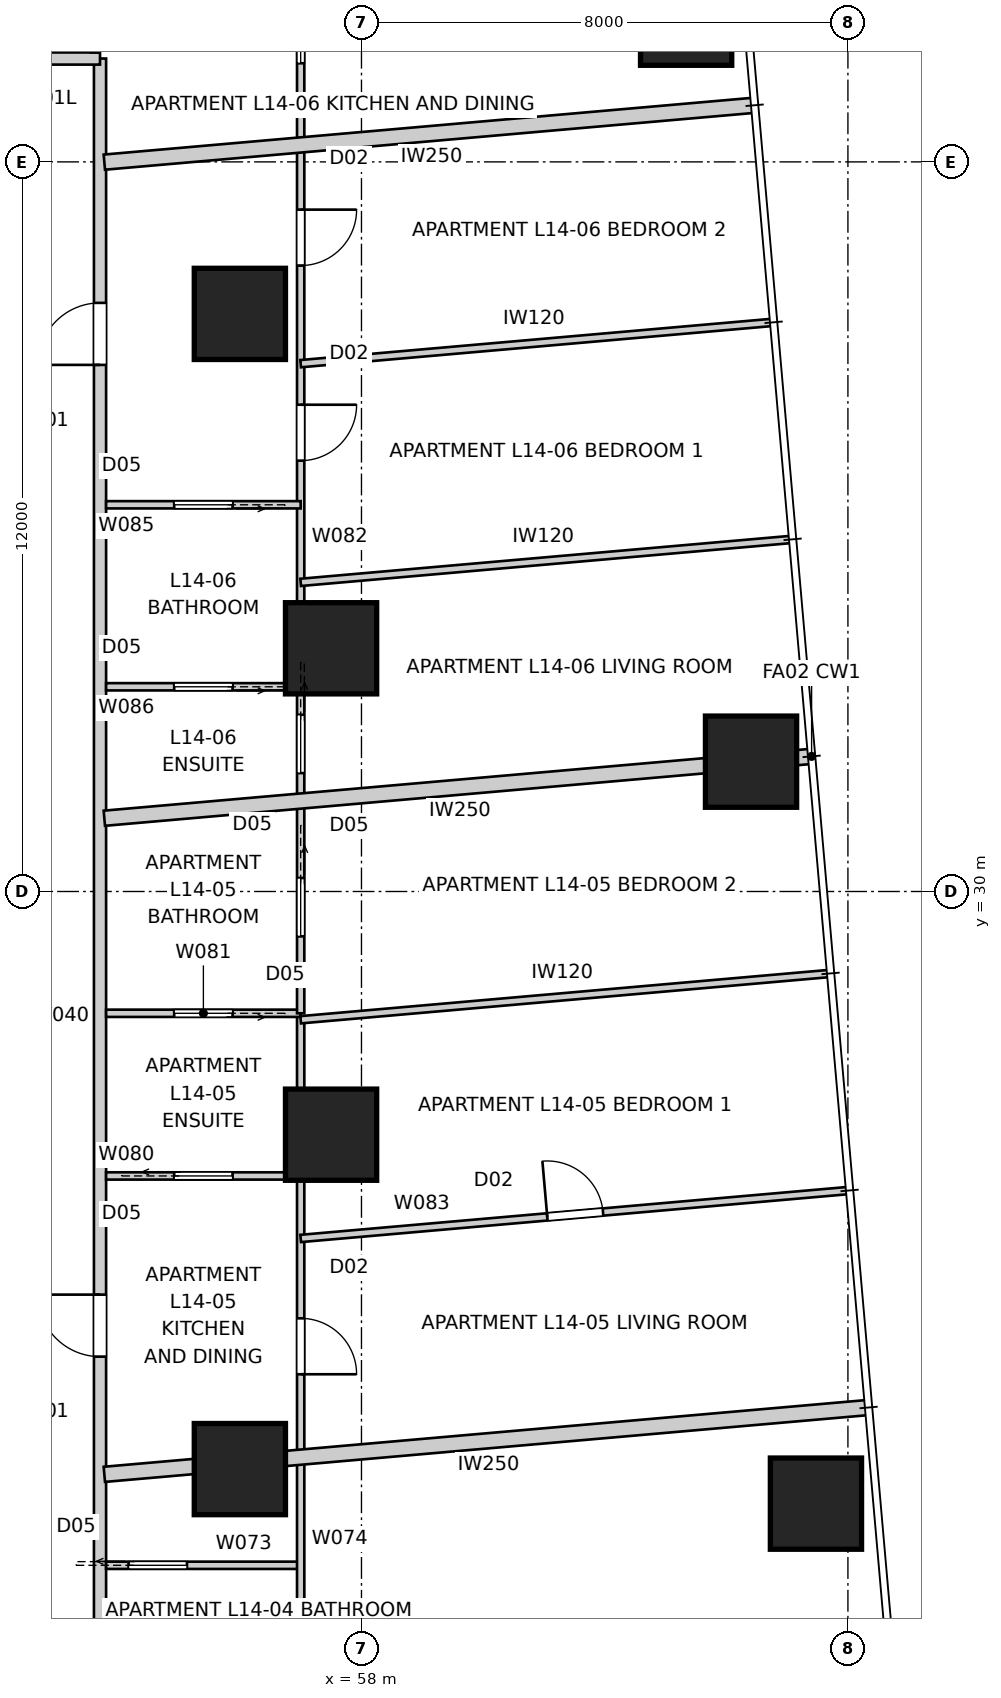
"""IFC4 building model, lengths in metres.
Left out: names, types, materials, properties, quantities, classifications, styles, units other than length and angle.
Written with IfcOpenShell. Run it as: python <this file> out.ifc"""

import sys

from ifc_helpers import new_model, si_unit, direction, frame, frame_2d, origin, origin_2d, place, context, subcontext, project, spatial, rectangle, extrude, element, fill, save


model = new_model("IFC4")
c1 = context("Model", 3, precision=1e-05, world=origin(), true_north=direction((0.0, 1.0)))
c2 = subcontext(c1, "Body", "Model", "MODEL_VIEW")
j1 = project(units=[si_unit("LENGTHUNIT", "METRE"), si_unit("PLANEANGLEUNIT", "RADIAN")], contexts=[c1])
p1 = place(None, origin())
s1 = spatial("IfcSite", under=j1, at=p1, CompositionType="ELEMENT")
p2 = place(p1, origin())
s2 = spatial("IfcBuilding", under=s1, at=p2, CompositionType="ELEMENT")
p3 = place(p2, frame((0.0, 0.0, 54.0)))
s3 = spatial("IfcBuildingStorey", under=s2, at=p3, CompositionType="ELEMENT", Elevation=54.0)
for number, where, z_axis, x_axis in (
    (1, (65.474, 19.932, 0.0), (0.0, 0.0, 1.0), (1.0, 0.0, 0.0)),
    (2, (64.407, 32.135, 0.0), (0.0, 0.0, 1.0), (1.0, 0.0, 0.0)),
    (3, (63.339, 44.339, 0.0), (0.0, 0.0, 1.0), (1.0, 0.0, 0.0)),
    (4, (57.5, 26.0, 0.0), (0.0, 0.0, 1.0), (1.0, 0.0, 0.0)),
    (5, (57.5, 34.0, 0.0), (0.0, 0.0, 1.0), (1.0, 0.0, 0.0)),
    (6, (56.0, 39.5, 0.0), (0.0, 0.0, 1.0), (1.0, 0.0, 0.0)),
    (7, (56.0, 20.5, 0.0), (0.0, 0.0, 1.0), (1.0, 0.0, 0.0)),
):
    element("IfcColumn", number, at=place(p3, frame(where, z_axis=z_axis, x_axis=x_axis)), inside=s3, PredefinedType="COLUMN", context=c2, shape_type="SweptSolid", body=[
        extrude(rectangle(XDim=1.5, YDim=1.5, at=origin_2d()), origin(), (0.0, 0.0, 1.0), 3.4),
    ])
p4 = place(p3, frame((53.7, 15.5, 0.0), z_axis=(0.0, 0.0, 1.0), x_axis=(0.0, 1.0, 0.0)))
e8 = element("IfcWall", 8, at=p4, inside=s3, PredefinedType="PARTITIONING", context=c2, shape_type="SweptSolid", body=[
    extrude(rectangle(XDim=28.2, YDim=0.2, at=frame_2d((14.1, 0.0))), origin(), (0.0, 0.0, 1.0), 3.25),
])
p5 = place(p4, frame((23.161, 0.0, 0.0)))
e9 = element("IfcOpeningElement", 9, at=p5, cuts=e8, PredefinedType="OPENING", context=c2, shape_type="SweptSolid", body=[
    extrude(rectangle(XDim=1.02, YDim=2.34, at=frame_2d((0.51, 1.17))), frame((0.0, 0.11, 0.0), z_axis=(0.0, -1.0, 0.0), x_axis=(1.0, 0.0, 0.0)), (0.0, 0.0, 1.0), 0.22),
])
p6 = place(p4, frame((6.85, 0.0, 0.0)))
e10 = element("IfcOpeningElement", 10, at=p6, cuts=e8, PredefinedType="OPENING", context=c2, shape_type="SweptSolid", body=[
    extrude(rectangle(XDim=1.02, YDim=2.34, at=frame_2d((0.51, 1.17))), frame((0.0, 0.11, 0.0), z_axis=(0.0, -1.0, 0.0), x_axis=(1.0, 0.0, 0.0)), (0.0, 0.0, 1.0), 0.22),
])
p7 = place(p3, frame((53.7, 43.7, 0.0), z_axis=(0.0, 0.0, 1.0), x_axis=(-1.0, 0.0, 0.0)))
e11 = element("IfcWall", 11, at=p7, inside=s3, PredefinedType="PARTITIONING", context=c2, shape_type="SweptSolid", body=[
    extrude(rectangle(XDim=28.2, YDim=0.2, at=frame_2d((14.1, 0.0))), origin(), (0.0, 0.0, 1.0), 3.25),
])
p8 = place(p7, frame((6.194, 0.0, 0.0)))
e12 = element("IfcOpeningElement", 12, at=p8, cuts=e11, PredefinedType="OPENING", context=c2, shape_type="SweptSolid", body=[
    extrude(rectangle(XDim=1.02, YDim=2.34, at=frame_2d((0.51, 1.17))), frame((0.0, 0.11, 0.0), z_axis=(0.0, -1.0, 0.0), x_axis=(1.0, 0.0, 0.0)), (0.0, 0.0, 1.0), 0.22),
])
p9 = place(p7, frame((1.715, 0.0, 0.0)))
e13 = element("IfcOpeningElement", 13, at=p9, cuts=e11, PredefinedType="OPENING", context=c2, shape_type="SweptSolid", body=[
    extrude(rectangle(XDim=1.02, YDim=2.1, at=frame_2d((0.51, 1.05))), frame((0.0, 0.11, 0.0), z_axis=(0.0, -1.0, 0.0), x_axis=(1.0, 0.0, 0.0)), (0.0, 0.0, 1.0), 0.22),
])
p10 = place(p7, frame((16.215, 0.0, 0.0)))
e14 = element("IfcOpeningElement", 14, at=p10, cuts=e11, PredefinedType="OPENING", context=c2, shape_type="SweptSolid", body=[
    extrude(rectangle(XDim=1.02, YDim=2.34, at=frame_2d((0.51, 1.17))), frame((0.0, 0.11, 0.0), z_axis=(0.0, -1.0, 0.0), x_axis=(1.0, 0.0, 0.0)), (0.0, 0.0, 1.0), 0.22),
])
p11 = place(p7, frame((26.255, 0.0, 0.0)))
e15 = element("IfcOpeningElement", 15, at=p11, cuts=e11, PredefinedType="OPENING", context=c2, shape_type="SweptSolid", body=[
    extrude(rectangle(XDim=1.02, YDim=2.34, at=frame_2d((0.51, 1.17))), frame((0.0, 0.11, 0.0), z_axis=(0.0, -1.0, 0.0), x_axis=(1.0, 0.0, 0.0)), (0.0, 0.0, 1.0), 0.22),
])
p12 = place(p3, frame((65.403, 32.222, 0.0), z_axis=(0.0, 0.0, 1.0), x_axis=(-0.996195419442, -0.087147497287, 0.0)))
e16 = element("IfcWall", 16, at=p12, inside=s3, PredefinedType="PARTITIONING", context=c2, shape_type="SweptSolid", body=[
    extrude(rectangle(XDim=11.677, YDim=0.25, at=frame_2d((5.838, 0.0))), origin(), (0.0, 0.0, 1.0), 3.25),
])
p13 = place(p3, frame((66.34, 21.513, 0.0), z_axis=(0.0, 0.0, 1.0), x_axis=(-0.996194851608, -0.087153988028, 0.0)))
e17 = element("IfcWall", 17, at=p13, inside=s3, PredefinedType="PARTITIONING", context=c2, shape_type="SweptSolid", body=[
    extrude(rectangle(XDim=12.617, YDim=0.25, at=frame_2d((6.309, 0.0))), origin(), (0.0, 0.0, 1.0), 3.25),
])
p14 = place(p3, frame((64.466, 42.932, 0.0), z_axis=(0.0, 0.0, 1.0), x_axis=(-0.996193939644, -0.08716441141, 0.0)))
e18 = element("IfcWall", 18, at=p14, inside=s3, PredefinedType="PARTITIONING", context=c2, shape_type="SweptSolid", body=[
    extrude(rectangle(XDim=10.736, YDim=0.25, at=frame_2d((5.368, 0.0))), origin(), (0.0, 0.0, 1.0), 3.25),
])
p15 = place(p3, frame((53.8, 18.918, 0.0), z_axis=(0.0, 0.0, 1.0), x_axis=(1.0, 0.0, 0.0)))
e19 = element("IfcWall", 19, at=p15, inside=s3, PredefinedType="PARTITIONING", context=c2, shape_type="SweptSolid", body=[
    extrude(rectangle(XDim=3.2, YDim=0.12, at=frame_2d((1.6, 0.0))), origin(), (0.0, 0.0, 1.0), 3.25),
])
p16 = place(p15, frame((0.37, 0.0, 0.0)))
e20 = element("IfcOpeningElement", 20, at=p16, cuts=e19, PredefinedType="OPENING", context=c2, shape_type="SweptSolid", body=[
    extrude(rectangle(XDim=0.96, YDim=2.1, at=frame_2d((0.48, 1.05))), frame((0.0, 0.07, 0.0), z_axis=(0.0, -1.0, 0.0), x_axis=(1.0, 0.0, 0.0)), (0.0, 0.0, 1.0), 0.14),
])
p17 = place(p3, frame((57.0, 27.94, 0.0), z_axis=(0.0, 0.0, 1.0), x_axis=(0.0, -1.0, 0.0)))
e21 = element("IfcWall", 21, at=p17, inside=s3, PredefinedType="PARTITIONING", context=c2, shape_type="SweptSolid", body=[
    extrude(rectangle(XDim=14.94, YDim=0.12, at=frame_2d((7.47, 0.0))), origin(), (0.0, 0.0, 1.0), 2.55),
])
p18 = place(p17, frame((4.961, 0.0, 0.0)))
e22 = element("IfcOpeningElement", 22, at=p18, cuts=e21, PredefinedType="OPENING", context=c2, shape_type="SweptSolid", body=[
    extrude(rectangle(XDim=0.92, YDim=2.34, at=frame_2d((0.46, 1.17))), frame((0.0, 0.07, 0.0), z_axis=(0.0, -1.0, 0.0), x_axis=(1.0, 0.0, 0.0)), (0.0, 0.0, 1.0), 0.14),
])
p19 = place(p17, frame((11.296, 0.0, 0.0)))
e23 = element("IfcOpeningElement", 23, at=p19, cuts=e21, PredefinedType="OPENING", context=c2, shape_type="SweptSolid", body=[
    extrude(rectangle(XDim=0.92, YDim=2.34, at=frame_2d((0.46, 1.17))), frame((0.0, 0.07, 0.0), z_axis=(0.0, -1.0, 0.0), x_axis=(1.0, 0.0, 0.0)), (0.0, 0.0, 1.0), 0.14),
])
p20 = place(p3, frame((53.8, 25.322, 0.0), z_axis=(0.0, 0.0, 1.0), x_axis=(1.0, 0.0, 0.0)))
e24 = element("IfcWall", 24, at=p20, inside=s3, PredefinedType="PARTITIONING", context=c2, shape_type="SweptSolid", body=[
    extrude(rectangle(XDim=3.2, YDim=0.12, at=frame_2d((1.6, 0.0))), origin(), (0.0, 0.0, 1.0), 3.25),
])
p21 = place(p20, frame((1.12, 0.0, 0.0)))
e25 = element("IfcOpeningElement", 25, at=p21, cuts=e24, PredefinedType="OPENING", context=c2, shape_type="SweptSolid", body=[
    extrude(rectangle(XDim=0.96, YDim=2.1, at=frame_2d((0.48, 1.05))), frame((0.0, 0.07, 0.0), z_axis=(0.0, -1.0, 0.0), x_axis=(1.0, 0.0, 0.0)), (0.0, 0.0, 1.0), 0.14),
])
p22 = place(p3, frame((57.0, 27.997, 0.0), z_axis=(0.0, 0.0, 1.0), x_axis=(-1.0, 0.0, 0.0)))
e26 = element("IfcWall", 26, at=p22, inside=s3, PredefinedType="PARTITIONING", context=c2, shape_type="SweptSolid", body=[
    extrude(rectangle(XDim=3.2, YDim=0.12, at=frame_2d((1.6, 0.0))), origin(), (0.0, 0.0, 1.0), 3.25),
])
p23 = place(p22, frame((1.12, 0.0, 0.0)))
e27 = element("IfcOpeningElement", 27, at=p23, cuts=e26, PredefinedType="OPENING", context=c2, shape_type="SweptSolid", body=[
    extrude(rectangle(XDim=0.96, YDim=2.1, at=frame_2d((0.48, 1.05))), frame((0.0, 0.07, 0.0), z_axis=(0.0, -1.0, 0.0), x_axis=(1.0, 0.0, 0.0)), (0.0, 0.0, 1.0), 0.14),
])
p24 = place(p3, frame((57.0, 47.0, 0.0), z_axis=(0.0, 0.0, 1.0), x_axis=(0.0, -1.0, 0.0)))
e28 = element("IfcWall", 28, at=p24, inside=s3, PredefinedType="PARTITIONING", context=c2, shape_type="SweptSolid", body=[
    extrude(rectangle(XDim=19.003, YDim=0.12, at=frame_2d((9.501, 0.0))), origin(), (0.0, 0.0, 1.0), 2.55),
])
p25 = place(p24, frame((5.785, 0.0, 0.0)))
e29 = element("IfcOpeningElement", 29, at=p25, cuts=e28, PredefinedType="OPENING", context=c2, shape_type="SweptSolid", body=[
    extrude(rectangle(XDim=0.92, YDim=2.34, at=frame_2d((0.46, 1.17))), frame((0.0, 0.07, 0.0), z_axis=(0.0, -1.0, 0.0), x_axis=(1.0, 0.0, 0.0)), (0.0, 0.0, 1.0), 0.14),
])
p26 = place(p24, frame((8.994, 0.0, 0.0)))
e30 = element("IfcOpeningElement", 30, at=p26, cuts=e28, PredefinedType="OPENING", context=c2, shape_type="SweptSolid", body=[
    extrude(rectangle(XDim=0.92, YDim=2.34, at=frame_2d((0.46, 1.17))), frame((0.0, 0.07, 0.0), z_axis=(0.0, -1.0, 0.0), x_axis=(1.0, 0.0, 0.0)), (0.0, 0.0, 1.0), 0.14),
])
p27 = place(p24, frame((2.418, 0.0, 0.0)))
e31 = element("IfcOpeningElement", 31, at=p27, cuts=e28, PredefinedType="OPENING", context=c2, shape_type="SweptSolid", body=[
    extrude(rectangle(XDim=0.96, YDim=2.1, at=frame_2d((0.48, 1.05))), frame((0.0, 0.07, 0.0), z_axis=(0.0, -1.0, 0.0), x_axis=(1.0, 0.0, 0.0)), (0.0, 0.0, 1.0), 0.14),
])
p28 = place(p24, frame((14.093, 0.0, 0.0)))
e32 = element("IfcOpeningElement", 32, at=p28, cuts=e28, PredefinedType="OPENING", context=c2, shape_type="SweptSolid", body=[
    extrude(rectangle(XDim=0.96, YDim=2.1, at=frame_2d((0.48, 1.05))), frame((0.0, 0.07, 0.0), z_axis=(0.0, -1.0, 0.0), x_axis=(1.0, 0.0, 0.0)), (0.0, 0.0, 1.0), 0.14),
])
p29 = place(p24, frame((16.778, 0.0, 0.0)))
e33 = element("IfcOpeningElement", 33, at=p29, cuts=e28, PredefinedType="OPENING", context=c2, shape_type="SweptSolid", body=[
    extrude(rectangle(XDim=0.96, YDim=2.1, at=frame_2d((0.48, 1.05))), frame((0.0, 0.07, 0.0), z_axis=(0.0, -1.0, 0.0), x_axis=(1.0, 0.0, 0.0)), (0.0, 0.0, 1.0), 0.14),
])
p30 = place(p3, frame((57.0, 24.293, 0.0), z_axis=(0.0, 0.0, 1.0), x_axis=(0.996194246178, 0.087160907995, 0.0)))
e34 = element("IfcWall", 34, at=p30, inside=s3, PredefinedType="PARTITIONING", context=c2, shape_type="SweptSolid", body=[
    extrude(rectangle(XDim=9.022, YDim=0.12, at=frame_2d((4.511, 0.0))), origin(), (0.0, 0.0, 1.0), 3.25),
])
p31 = place(p30, frame((4.071, 0.0, 0.0)))
e35 = element("IfcOpeningElement", 35, at=p31, cuts=e34, PredefinedType="OPENING", context=c2, shape_type="SweptSolid", body=[
    extrude(rectangle(XDim=0.92, YDim=2.34, at=frame_2d((0.46, 1.17))), frame((0.0, 0.07, 0.0), z_axis=(0.0, -1.0, 0.0), x_axis=(1.0, 0.0, 0.0)), (0.0, 0.0, 1.0), 0.14),
])
p32 = place(p3, frame((57.0, 27.89, 0.0), z_axis=(0.0, 0.0, 1.0), x_axis=(0.996194478193, 0.087158256162, 0.0)))
e36 = element("IfcWall", 36, at=p32, inside=s3, PredefinedType="PARTITIONING", context=c2, shape_type="SweptSolid", body=[
    extrude(rectangle(XDim=8.709, YDim=0.12, at=frame_2d((4.354, 0.0))), origin(), (0.0, 0.0, 1.0), 3.25),
])
p33 = place(p3, frame((57.0, 36.36, 0.0), z_axis=(0.0, 0.0, 1.0), x_axis=(-1.0, 0.0, 0.0)))
e37 = element("IfcWall", 37, at=p33, inside=s3, PredefinedType="PARTITIONING", context=c2, shape_type="SweptSolid", body=[
    extrude(rectangle(XDim=3.2, YDim=0.12, at=frame_2d((1.6, 0.0))), origin(), (0.0, 0.0, 1.0), 3.25),
])
p34 = place(p33, frame((1.12, 0.0, 0.0)))
e38 = element("IfcOpeningElement", 38, at=p34, cuts=e37, PredefinedType="OPENING", context=c2, shape_type="SweptSolid", body=[
    extrude(rectangle(XDim=0.96, YDim=2.1, at=frame_2d((0.48, 1.05))), frame((0.0, 0.07, 0.0), z_axis=(0.0, -1.0, 0.0), x_axis=(1.0, 0.0, 0.0)), (0.0, 0.0, 1.0), 0.14),
])
p35 = place(p3, frame((57.0, 33.367, 0.0), z_axis=(0.0, 0.0, 1.0), x_axis=(-1.0, 0.0, 0.0)))
e39 = element("IfcWall", 39, at=p35, inside=s3, PredefinedType="PARTITIONING", context=c2, shape_type="SweptSolid", body=[
    extrude(rectangle(XDim=3.2, YDim=0.12, at=frame_2d((1.6, 0.0))), origin(), (0.0, 0.0, 1.0), 3.25),
])
p36 = place(p35, frame((1.12, 0.0, 0.0)))
e40 = element("IfcOpeningElement", 40, at=p36, cuts=e39, PredefinedType="OPENING", context=c2, shape_type="SweptSolid", body=[
    extrude(rectangle(XDim=0.96, YDim=2.1, at=frame_2d((0.48, 1.05))), frame((0.0, 0.07, 0.0), z_axis=(0.0, -1.0, 0.0), x_axis=(1.0, 0.0, 0.0)), (0.0, 0.0, 1.0), 0.14),
])
p37 = place(p3, frame((57.0, 35.084, 0.0), z_axis=(0.0, 0.0, 1.0), x_axis=(0.99619214338, 0.087184938313, 0.0)))
e41 = element("IfcWall", 41, at=p37, inside=s3, PredefinedType="PARTITIONING", context=c2, shape_type="SweptSolid", body=[
    extrude(rectangle(XDim=8.082, YDim=0.12, at=frame_2d((4.041, 0.0))), origin(), (0.0, 0.0, 1.0), 3.25),
])
p38 = place(p3, frame((57.0, 38.681, 0.0), z_axis=(0.0, 0.0, 1.0), x_axis=(0.996195047824, 0.0871517452, 0.0)))
e42 = element("IfcWall", 42, at=p38, inside=s3, PredefinedType="PARTITIONING", context=c2, shape_type="SweptSolid", body=[
    extrude(rectangle(XDim=7.768, YDim=0.12, at=frame_2d((3.884, 0.0))), origin(), (0.0, 0.0, 1.0), 3.25),
])
p39 = place(p3, frame((53.606, 47.0, 0.0), z_axis=(0.0, 0.0, 1.0), x_axis=(0.0, -1.0, 0.0)))
e43 = element("IfcWall", 43, at=p39, inside=s3, PredefinedType="PARTITIONING", context=c2, shape_type="SweptSolid", body=[
    extrude(rectangle(XDim=3.2, YDim=0.12, at=frame_2d((1.6, 0.0))), origin(), (0.0, 0.0, 1.0), 3.25),
])
p40 = place(p39, frame((1.12, 0.0, 0.0)))
e44 = element("IfcOpeningElement", 44, at=p40, cuts=e43, PredefinedType="OPENING", context=c2, shape_type="SweptSolid", body=[
    extrude(rectangle(XDim=0.96, YDim=2.1, at=frame_2d((0.48, 1.05))), frame((0.0, 0.07, 0.0), z_axis=(0.0, -1.0, 0.0), x_axis=(1.0, 0.0, 0.0)), (0.0, 0.0, 1.0), 0.14),
])
p41 = place(p5, origin())
e45 = element("IfcDoor", 45, at=p41, inside=s3, OperationType="SINGLE_SWING_LEFT", PredefinedType="DOOR", context=c2, shape_type="SweptSolid", body=[
    extrude(rectangle(XDim=1.02, YDim=2.34, at=frame_2d((0.51, 1.17))), frame((0.0, 0.025, 0.0), z_axis=(0.0, -1.0, 0.0), x_axis=(1.0, 0.0, 0.0)), (0.0, 0.0, 1.0), 0.05),
])
fill(e9, e45)
p42 = place(p6, origin())
e46 = element("IfcDoor", 46, at=p42, inside=s3, OperationType="SINGLE_SWING_RIGHT", PredefinedType="DOOR", context=c2, shape_type="SweptSolid", body=[
    extrude(rectangle(XDim=1.02, YDim=2.34, at=frame_2d((0.51, 1.17))), frame((0.0, 0.025, 0.0), z_axis=(0.0, -1.0, 0.0), x_axis=(1.0, 0.0, 0.0)), (0.0, 0.0, 1.0), 0.05),
])
fill(e10, e46)
p43 = place(p25, origin())
e47 = element("IfcDoor", 47, at=p43, inside=s3, OperationType="SINGLE_SWING_LEFT", PredefinedType="DOOR", context=c2, shape_type="SweptSolid", body=[
    extrude(rectangle(XDim=0.92, YDim=2.34, at=frame_2d((0.46, 1.17))), frame((0.0, 0.025, 0.0), z_axis=(0.0, -1.0, 0.0), x_axis=(1.0, 0.0, 0.0)), (0.0, 0.0, 1.0), 0.05),
])
fill(e29, e47)
p44 = place(p34, origin())
e48 = element("IfcDoor", 48, at=p44, inside=s3, OperationType="SLIDING_TO_LEFT", PredefinedType="DOOR", context=c2, shape_type="SweptSolid", body=[
    extrude(rectangle(XDim=0.96, YDim=2.1, at=frame_2d((0.48, 1.05))), frame((0.0, 0.025, 0.0), z_axis=(0.0, -1.0, 0.0), x_axis=(1.0, 0.0, 0.0)), (0.0, 0.0, 1.0), 0.05),
])
fill(e38, e48)
p45 = place(p26, origin())
e49 = element("IfcDoor", 49, at=p45, inside=s3, OperationType="SINGLE_SWING_LEFT", PredefinedType="DOOR", context=c2, shape_type="SweptSolid", body=[
    extrude(rectangle(XDim=0.92, YDim=2.34, at=frame_2d((0.46, 1.17))), frame((0.0, 0.025, 0.0), z_axis=(0.0, -1.0, 0.0), x_axis=(1.0, 0.0, 0.0)), (0.0, 0.0, 1.0), 0.05),
])
fill(e30, e49)
p46 = place(p18, origin())
e50 = element("IfcDoor", 50, at=p46, inside=s3, OperationType="SINGLE_SWING_RIGHT", PredefinedType="DOOR", context=c2, shape_type="SweptSolid", body=[
    extrude(rectangle(XDim=0.92, YDim=2.34, at=frame_2d((0.46, 1.17))), frame((0.0, 0.025, 0.0), z_axis=(0.0, -1.0, 0.0), x_axis=(1.0, 0.0, 0.0)), (0.0, 0.0, 1.0), 0.05),
])
fill(e22, e50)
p47 = place(p21, origin())
e51 = element("IfcDoor", 51, at=p47, inside=s3, OperationType="SLIDING_TO_LEFT", PredefinedType="DOOR", context=c2, shape_type="SweptSolid", body=[
    extrude(rectangle(XDim=0.96, YDim=2.1, at=frame_2d((0.48, 1.05))), frame((0.0, 0.025, 0.0), z_axis=(0.0, -1.0, 0.0), x_axis=(1.0, 0.0, 0.0)), (0.0, 0.0, 1.0), 0.05),
])
fill(e25, e51)
p48 = place(p16, origin())
e52 = element("IfcDoor", 52, at=p48, inside=s3, OperationType="SLIDING_TO_LEFT", PredefinedType="DOOR", context=c2, shape_type="SweptSolid", body=[
    extrude(rectangle(XDim=0.96, YDim=2.1, at=frame_2d((0.48, 1.05))), frame((0.0, 0.025, 0.0), z_axis=(0.0, -1.0, 0.0), x_axis=(1.0, 0.0, 0.0)), (0.0, 0.0, 1.0), 0.05),
])
fill(e20, e52)
p49 = place(p36, origin())
e53 = element("IfcDoor", 53, at=p49, inside=s3, OperationType="SLIDING_TO_LEFT", PredefinedType="DOOR", context=c2, shape_type="SweptSolid", body=[
    extrude(rectangle(XDim=0.96, YDim=2.1, at=frame_2d((0.48, 1.05))), frame((0.0, 0.025, 0.0), z_axis=(0.0, -1.0, 0.0), x_axis=(1.0, 0.0, 0.0)), (0.0, 0.0, 1.0), 0.05),
])
fill(e40, e53)
p50 = place(p31, origin())
e54 = element("IfcDoor", 54, at=p50, inside=s3, OperationType="SINGLE_SWING_LEFT", PredefinedType="DOOR", context=c2, shape_type="SweptSolid", body=[
    extrude(rectangle(XDim=0.92, YDim=2.34, at=frame_2d((0.46, 1.17))), frame((0.0, 0.025, 0.0), z_axis=(0.0, -1.0, 0.0), x_axis=(1.0, 0.0, 0.0)), (0.0, 0.0, 1.0), 0.05),
])
fill(e35, e54)
p51 = place(p23, origin())
e55 = element("IfcDoor", 55, at=p51, inside=s3, OperationType="SLIDING_TO_LEFT", PredefinedType="DOOR", context=c2, shape_type="SweptSolid", body=[
    extrude(rectangle(XDim=0.96, YDim=2.1, at=frame_2d((0.48, 1.05))), frame((0.0, 0.025, 0.0), z_axis=(0.0, -1.0, 0.0), x_axis=(1.0, 0.0, 0.0)), (0.0, 0.0, 1.0), 0.05),
])
fill(e27, e55)
p52 = place(p27, origin())
e56 = element("IfcDoor", 56, at=p52, inside=s3, OperationType="SLIDING_TO_LEFT", PredefinedType="DOOR", context=c2, shape_type="SweptSolid", body=[
    extrude(rectangle(XDim=0.96, YDim=2.1, at=frame_2d((0.48, 1.05))), frame((0.0, 0.025, 0.0), z_axis=(0.0, -1.0, 0.0), x_axis=(1.0, 0.0, 0.0)), (0.0, 0.0, 1.0), 0.05),
])
fill(e31, e56)
p53 = place(p28, origin())
e57 = element("IfcDoor", 57, at=p53, inside=s3, OperationType="SLIDING_TO_LEFT", PredefinedType="DOOR", context=c2, shape_type="SweptSolid", body=[
    extrude(rectangle(XDim=0.96, YDim=2.1, at=frame_2d((0.48, 1.05))), frame((0.0, 0.025, 0.0), z_axis=(0.0, -1.0, 0.0), x_axis=(1.0, 0.0, 0.0)), (0.0, 0.0, 1.0), 0.05),
])
fill(e32, e57)
p54 = place(p29, origin())
e58 = element("IfcDoor", 58, at=p54, inside=s3, OperationType="SLIDING_TO_LEFT", PredefinedType="DOOR", context=c2, shape_type="SweptSolid", body=[
    extrude(rectangle(XDim=0.96, YDim=2.1, at=frame_2d((0.48, 1.05))), frame((0.0, 0.025, 0.0), z_axis=(0.0, -1.0, 0.0), x_axis=(1.0, 0.0, 0.0)), (0.0, 0.0, 1.0), 0.05),
])
fill(e33, e58)
save(model, sys.argv[1])
